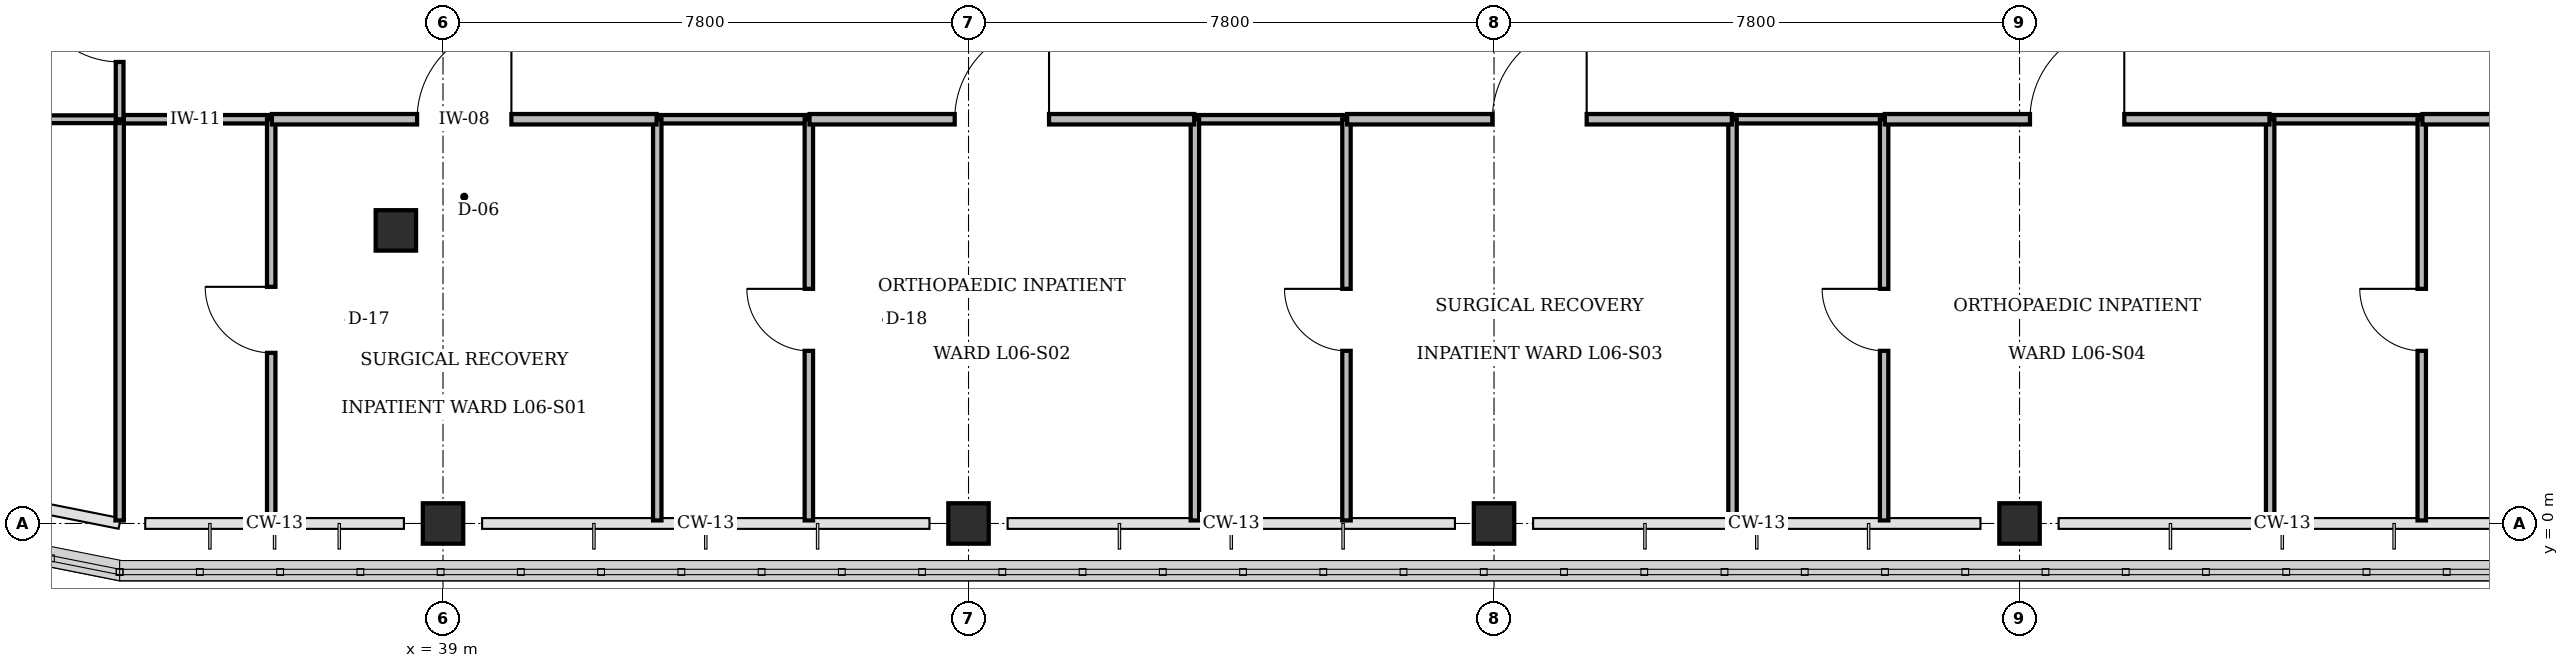
"""IFC4 building model, lengths in metres.
Left out: names, types, materials, properties, quantities, classifications, styles, units other than length and angle.
Written with IfcOpenShell. Run it as: python <this file> out.ifc"""

import sys

from ifc_helpers import new_model, si_unit, direction, frame, frame_2d, origin, origin_2d, place, context, subcontext, project, spatial, rectangle, circle, extrude, element, fill, save


model = new_model("IFC4")
c1 = context("Model", 3, precision=1e-05, world=origin(), true_north=direction((0.0, 1.0)))
c2 = subcontext(c1, "Body", "Model", "MODEL_VIEW")
j1 = project(units=[si_unit("LENGTHUNIT", "METRE"), si_unit("PLANEANGLEUNIT", "RADIAN")], contexts=[c1])
p1 = place(None, origin())
s1 = spatial("IfcSite", under=j1, at=p1, CompositionType="ELEMENT")
p2 = place(p1, origin())
s2 = spatial("IfcBuilding", under=s1, at=p2, CompositionType="ELEMENT")
p3 = place(p2, frame((0.0, 0.0, 26.4)))
s3 = spatial("IfcBuildingStorey", under=s2, at=p3, CompositionType="ELEMENT", Elevation=26.4)
for number, where, z_axis, x_axis in (
    (1, (39.0, 0.0, 0.0), (0.0, 0.0, 1.0), (1.0, 0.0, 0.0)),
    (2, (46.8, 0.0, 0.0), (0.0, 0.0, 1.0), (1.0, 0.0, 0.0)),
    (3, (54.6, 0.0, 0.0), (0.0, 0.0, 1.0), (1.0, 0.0, 0.0)),
    (4, (62.4, 0.0, 0.0), (0.0, 0.0, 1.0), (1.0, 0.0, 0.0)),
):
    element("IfcColumn", number, at=place(p3, frame(where, z_axis=z_axis, x_axis=x_axis)), inside=s3, PredefinedType="COLUMN", context=c2, shape_type="SweptSolid", body=[
        extrude(rectangle(XDim=0.6, YDim=0.6, at=origin_2d()), origin(), (0.0, 0.0, 1.0), 4.2),
    ])
p4 = place(p3, frame((38.3, 4.35, 0.0), z_axis=(0.0, 0.0, 1.0), x_axis=(1.0, 0.0, 0.0)))
e5 = element("IfcColumn", 5, at=p4, inside=s3, PredefinedType="PILASTER", context=c2, shape_type="SweptSolid", body=[
    extrude(circle(Radius=0.3, at=origin_2d()), origin(), (0.0, 0.0, 1.0), 4.2),
])
p5 = place(p3, frame((34.2, 6.0, 0.0), z_axis=(0.0, 0.0, 1.0), x_axis=(1.0, 0.0, 0.0)))
e6 = element("IfcWall", 6, at=p5, inside=s3, PredefinedType="PARTITIONING", context=c2, shape_type="SweptSolid", body=[
    extrude(rectangle(XDim=2.25, YDim=0.125, at=frame_2d((1.125, 0.0))), origin(), (0.0, 0.0, 1.0), 3.9),
])
p6 = place(p3, frame((34.2, 0.045, 0.0), z_axis=(0.0, 0.0, 1.0), x_axis=(0.0, 1.0, 0.0)))
e7 = element("IfcWall", 7, at=p6, inside=s3, PredefinedType="PARTITIONING", context=c2, shape_type="SweptSolid", body=[
    extrude(rectangle(XDim=5.955, YDim=0.125, at=frame_2d((2.978, 0.0))), origin(), (0.0, 0.0, 1.0), 3.9),
])
p7 = place(p3, frame((36.45, 0.045, 0.0), z_axis=(0.0, 0.0, 1.0), x_axis=(0.0, 1.0, 0.0)))
e8 = element("IfcWall", 8, at=p7, inside=s3, PredefinedType="PARTITIONING", context=c2, shape_type="SweptSolid", body=[
    extrude(rectangle(XDim=5.955, YDim=0.125, at=frame_2d((2.978, 0.0))), origin(), (0.0, 0.0, 1.0), 3.9),
])
p8 = place(p7, frame((2.488, 0.0, 0.0)))
e9 = element("IfcOpeningElement", 9, at=p8, cuts=e8, PredefinedType="OPENING", context=c2, shape_type="SweptSolid", body=[
    extrude(rectangle(XDim=0.98, YDim=2.1, at=frame_2d((0.49, 1.05))), frame((0.0, 0.073, 0.0), z_axis=(0.0, -1.0, 0.0), x_axis=(1.0, 0.0, 0.0)), (0.0, 0.0, 1.0), 0.145),
])
p9 = place(p3, frame((42.18, 6.0, 0.0), z_axis=(0.0, 0.0, 1.0), x_axis=(1.0, 0.0, 0.0)))
e10 = element("IfcWall", 10, at=p9, inside=s3, PredefinedType="PARTITIONING", context=c2, shape_type="SweptSolid", body=[
    extrude(rectangle(XDim=2.25, YDim=0.125, at=frame_2d((1.125, 0.0))), origin(), (0.0, 0.0, 1.0), 3.9),
])
p10 = place(p3, frame((42.18, 0.045, 0.0), z_axis=(0.0, 0.0, 1.0), x_axis=(0.0, 1.0, 0.0)))
e11 = element("IfcWall", 11, at=p10, inside=s3, PredefinedType="PARTITIONING", context=c2, shape_type="SweptSolid", body=[
    extrude(rectangle(XDim=5.955, YDim=0.125, at=frame_2d((2.978, 0.0))), origin(), (0.0, 0.0, 1.0), 3.9),
])
p11 = place(p3, frame((44.43, 0.045, 0.0), z_axis=(0.0, 0.0, 1.0), x_axis=(0.0, 1.0, 0.0)))
e12 = element("IfcWall", 12, at=p11, inside=s3, PredefinedType="PARTITIONING", context=c2, shape_type="SweptSolid", body=[
    extrude(rectangle(XDim=5.955, YDim=0.125, at=frame_2d((2.978, 0.0))), origin(), (0.0, 0.0, 1.0), 3.9),
])
p12 = place(p11, frame((2.518, 0.0, 0.0)))
e13 = element("IfcOpeningElement", 13, at=p12, cuts=e12, PredefinedType="OPENING", context=c2, shape_type="SweptSolid", body=[
    extrude(rectangle(XDim=0.92, YDim=2.1, at=frame_2d((0.46, 1.05))), frame((0.0, 0.073, 0.0), z_axis=(0.0, -1.0, 0.0), x_axis=(1.0, 0.0, 0.0)), (0.0, 0.0, 1.0), 0.145),
])
p13 = place(p3, frame((50.16, 6.0, 0.0), z_axis=(0.0, 0.0, 1.0), x_axis=(1.0, 0.0, 0.0)))
e14 = element("IfcWall", 14, at=p13, inside=s3, PredefinedType="PARTITIONING", context=c2, shape_type="SweptSolid", body=[
    extrude(rectangle(XDim=2.25, YDim=0.125, at=frame_2d((1.125, 0.0))), origin(), (0.0, 0.0, 1.0), 3.9),
])
p14 = place(p3, frame((50.16, 0.045, 0.0), z_axis=(0.0, 0.0, 1.0), x_axis=(0.0, 1.0, 0.0)))
e15 = element("IfcWall", 15, at=p14, inside=s3, PredefinedType="PARTITIONING", context=c2, shape_type="SweptSolid", body=[
    extrude(rectangle(XDim=5.955, YDim=0.125, at=frame_2d((2.978, 0.0))), origin(), (0.0, 0.0, 1.0), 3.9),
])
p15 = place(p3, frame((52.41, 0.045, 0.0), z_axis=(0.0, 0.0, 1.0), x_axis=(0.0, 1.0, 0.0)))
e16 = element("IfcWall", 16, at=p15, inside=s3, PredefinedType="PARTITIONING", context=c2, shape_type="SweptSolid", body=[
    extrude(rectangle(XDim=5.955, YDim=0.125, at=frame_2d((2.978, 0.0))), origin(), (0.0, 0.0, 1.0), 3.9),
])
p16 = place(p15, frame((2.518, 0.0, 0.0)))
e17 = element("IfcOpeningElement", 17, at=p16, cuts=e16, PredefinedType="OPENING", context=c2, shape_type="SweptSolid", body=[
    extrude(rectangle(XDim=0.92, YDim=2.1, at=frame_2d((0.46, 1.05))), frame((0.0, 0.073, 0.0), z_axis=(0.0, -1.0, 0.0), x_axis=(1.0, 0.0, 0.0)), (0.0, 0.0, 1.0), 0.145),
])
p17 = place(p3, frame((58.14, 6.0, 0.0), z_axis=(0.0, 0.0, 1.0), x_axis=(1.0, 0.0, 0.0)))
e18 = element("IfcWall", 18, at=p17, inside=s3, PredefinedType="PARTITIONING", context=c2, shape_type="SweptSolid", body=[
    extrude(rectangle(XDim=2.25, YDim=0.125, at=frame_2d((1.125, 0.0))), origin(), (0.0, 0.0, 1.0), 3.9),
])
p18 = place(p3, frame((58.14, 0.045, 0.0), z_axis=(0.0, 0.0, 1.0), x_axis=(0.0, 1.0, 0.0)))
e19 = element("IfcWall", 19, at=p18, inside=s3, PredefinedType="PARTITIONING", context=c2, shape_type="SweptSolid", body=[
    extrude(rectangle(XDim=5.955, YDim=0.125, at=frame_2d((2.978, 0.0))), origin(), (0.0, 0.0, 1.0), 3.9),
])
p19 = place(p3, frame((60.39, 0.045, 0.0), z_axis=(0.0, 0.0, 1.0), x_axis=(0.0, 1.0, 0.0)))
e20 = element("IfcWall", 20, at=p19, inside=s3, PredefinedType="PARTITIONING", context=c2, shape_type="SweptSolid", body=[
    extrude(rectangle(XDim=5.955, YDim=0.125, at=frame_2d((2.978, 0.0))), origin(), (0.0, 0.0, 1.0), 3.9),
])
p20 = place(p19, frame((2.518, 0.0, 0.0)))
e21 = element("IfcOpeningElement", 21, at=p20, cuts=e20, PredefinedType="OPENING", context=c2, shape_type="SweptSolid", body=[
    extrude(rectangle(XDim=0.92, YDim=2.1, at=frame_2d((0.46, 1.05))), frame((0.0, 0.073, 0.0), z_axis=(0.0, -1.0, 0.0), x_axis=(1.0, 0.0, 0.0)), (0.0, 0.0, 1.0), 0.145),
])
p21 = place(p3, frame((66.12, 6.0, 0.0), z_axis=(0.0, 0.0, 1.0), x_axis=(1.0, 0.0, 0.0)))
e22 = element("IfcWall", 22, at=p21, inside=s3, PredefinedType="PARTITIONING", context=c2, shape_type="SweptSolid", body=[
    extrude(rectangle(XDim=2.25, YDim=0.125, at=frame_2d((1.125, 0.0))), origin(), (0.0, 0.0, 1.0), 3.9),
])
p22 = place(p3, frame((66.12, 0.045, 0.0), z_axis=(0.0, 0.0, 1.0), x_axis=(0.0, 1.0, 0.0)))
e23 = element("IfcWall", 23, at=p22, inside=s3, PredefinedType="PARTITIONING", context=c2, shape_type="SweptSolid", body=[
    extrude(rectangle(XDim=5.955, YDim=0.125, at=frame_2d((2.978, 0.0))), origin(), (0.0, 0.0, 1.0), 3.9),
])
p23 = place(p3, frame((68.37, 0.045, 0.0), z_axis=(0.0, 0.0, 1.0), x_axis=(0.0, 1.0, 0.0)))
e24 = element("IfcWall", 24, at=p23, inside=s3, PredefinedType="PARTITIONING", context=c2, shape_type="SweptSolid", body=[
    extrude(rectangle(XDim=5.955, YDim=0.125, at=frame_2d((2.978, 0.0))), origin(), (0.0, 0.0, 1.0), 3.9),
])
p24 = place(p23, frame((2.518, 0.0, 0.0)))
e25 = element("IfcOpeningElement", 25, at=p24, cuts=e24, PredefinedType="OPENING", context=c2, shape_type="SweptSolid", body=[
    extrude(rectangle(XDim=0.92, YDim=2.1, at=frame_2d((0.46, 1.05))), frame((0.0, 0.073, 0.0), z_axis=(0.0, -1.0, 0.0), x_axis=(1.0, 0.0, 0.0)), (0.0, 0.0, 1.0), 0.145),
])
p25 = place(p3, frame((22.1, 6.0, 0.0), z_axis=(0.0, 0.0, 1.0), x_axis=(1.0, 0.0, 0.0)))
e26 = element("IfcWall", 26, at=p25, inside=s3, PredefinedType="PARTITIONING", context=c2, shape_type="SweptSolid", body=[
    extrude(rectangle(XDim=12.1, YDim=0.115, at=frame_2d((6.05, 0.0))), origin(), (0.0, 0.0, 1.0), 3.9),
])
p26 = place(p3, frame((34.2, 6.0, 0.0), z_axis=(0.0, 0.0, 1.0), x_axis=(0.0, 1.0, 0.0)))
e27 = element("IfcWall", 27, at=p26, inside=s3, PredefinedType="PARTITIONING", context=c2, shape_type="SweptSolid", body=[
    extrude(rectangle(XDim=13.2, YDim=0.115, at=frame_2d((6.6, 0.0))), origin(), (0.0, 0.0, 1.0), 3.9),
])
p27 = place(p26, frame((0.85, 0.0, 0.0)))
e28 = element("IfcOpeningElement", 28, at=p27, cuts=e27, PredefinedType="OPENING", context=c2, shape_type="SweptSolid", body=[
    extrude(rectangle(XDim=1.32, YDim=2.15, at=frame_2d((0.66, 1.075))), frame((0.0, 0.067, 0.0), z_axis=(0.0, -1.0, 0.0), x_axis=(1.0, 0.0, 0.0)), (0.0, 0.0, 1.0), 0.135),
])
p28 = place(p3, frame((36.46, 6.0, 0.0), z_axis=(0.0, 0.0, 1.0), x_axis=(1.0, 0.0, 0.0)))
e29 = element("IfcWall", 29, at=p28, inside=s3, PredefinedType="PARTITIONING", context=c2, shape_type="SweptSolid", body=[
    extrude(rectangle(XDim=5.71, YDim=0.155, at=frame_2d((2.855, 0.0))), origin(), (0.0, 0.0, 1.0), 3.9),
])
p29 = place(p28, frame((2.155, 0.0, 0.0)))
e30 = element("IfcOpeningElement", 30, at=p29, cuts=e29, PredefinedType="OPENING", context=c2, shape_type="SweptSolid", body=[
    extrude(rectangle(XDim=1.4, YDim=2.2, at=frame_2d((0.7, 1.1))), frame((0.0, 0.087, 0.0), z_axis=(0.0, -1.0, 0.0), x_axis=(1.0, 0.0, 0.0)), (0.0, 0.0, 1.0), 0.175),
])
p30 = place(p3, frame((44.44, 6.0, 0.0), z_axis=(0.0, 0.0, 1.0), x_axis=(1.0, 0.0, 0.0)))
e31 = element("IfcWall", 31, at=p30, inside=s3, PredefinedType="PARTITIONING", context=c2, shape_type="SweptSolid", body=[
    extrude(rectangle(XDim=5.71, YDim=0.155, at=frame_2d((2.855, 0.0))), origin(), (0.0, 0.0, 1.0), 3.9),
])
p31 = place(p30, frame((2.155, 0.0, 0.0)))
e32 = element("IfcOpeningElement", 32, at=p31, cuts=e31, PredefinedType="OPENING", context=c2, shape_type="SweptSolid", body=[
    extrude(rectangle(XDim=1.4, YDim=2.2, at=frame_2d((0.7, 1.1))), frame((0.0, 0.087, 0.0), z_axis=(0.0, -1.0, 0.0), x_axis=(1.0, 0.0, 0.0)), (0.0, 0.0, 1.0), 0.175),
])
p32 = place(p3, frame((52.42, 6.0, 0.0), z_axis=(0.0, 0.0, 1.0), x_axis=(1.0, 0.0, 0.0)))
e33 = element("IfcWall", 33, at=p32, inside=s3, PredefinedType="PARTITIONING", context=c2, shape_type="SweptSolid", body=[
    extrude(rectangle(XDim=5.71, YDim=0.155, at=frame_2d((2.855, 0.0))), origin(), (0.0, 0.0, 1.0), 3.9),
])
p33 = place(p32, frame((2.155, 0.0, 0.0)))
e34 = element("IfcOpeningElement", 34, at=p33, cuts=e33, PredefinedType="OPENING", context=c2, shape_type="SweptSolid", body=[
    extrude(rectangle(XDim=1.4, YDim=2.2, at=frame_2d((0.7, 1.1))), frame((0.0, 0.087, 0.0), z_axis=(0.0, -1.0, 0.0), x_axis=(1.0, 0.0, 0.0)), (0.0, 0.0, 1.0), 0.175),
])
p34 = place(p3, frame((60.4, 6.0, 0.0), z_axis=(0.0, 0.0, 1.0), x_axis=(1.0, 0.0, 0.0)))
e35 = element("IfcWall", 35, at=p34, inside=s3, PredefinedType="PARTITIONING", context=c2, shape_type="SweptSolid", body=[
    extrude(rectangle(XDim=5.71, YDim=0.155, at=frame_2d((2.855, 0.0))), origin(), (0.0, 0.0, 1.0), 3.9),
])
p35 = place(p34, frame((2.155, 0.0, 0.0)))
e36 = element("IfcOpeningElement", 36, at=p35, cuts=e35, PredefinedType="OPENING", context=c2, shape_type="SweptSolid", body=[
    extrude(rectangle(XDim=1.4, YDim=2.2, at=frame_2d((0.7, 1.1))), frame((0.0, 0.087, 0.0), z_axis=(0.0, -1.0, 0.0), x_axis=(1.0, 0.0, 0.0)), (0.0, 0.0, 1.0), 0.175),
])
p36 = place(p3, frame((68.38, 6.0, 0.0), z_axis=(0.0, 0.0, 1.0), x_axis=(1.0, 0.0, 0.0)))
e37 = element("IfcWall", 37, at=p36, inside=s3, PredefinedType="PARTITIONING", context=c2, shape_type="SweptSolid", body=[
    extrude(rectangle(XDim=5.71, YDim=0.155, at=frame_2d((2.855, 0.0))), origin(), (0.0, 0.0, 1.0), 3.9),
])
p37 = place(p36, frame((2.155, 0.0, 0.0)))
e38 = element("IfcOpeningElement", 38, at=p37, cuts=e37, PredefinedType="OPENING", context=c2, shape_type="SweptSolid", body=[
    extrude(rectangle(XDim=1.4, YDim=2.2, at=frame_2d((0.7, 1.1))), frame((0.0, 0.087, 0.0), z_axis=(0.0, -1.0, 0.0), x_axis=(1.0, 0.0, 0.0)), (0.0, 0.0, 1.0), 0.175),
])
p38 = place(p8, origin())
e39 = element("IfcDoor", 39, at=p38, inside=s3, OperationType="SINGLE_SWING_RIGHT", PredefinedType="DOOR", context=c2, shape_type="SweptSolid", body=[
    extrude(rectangle(XDim=0.98, YDim=2.1, at=frame_2d((0.49, 1.05))), frame((0.0, 0.025, 0.0), z_axis=(0.0, -1.0, 0.0), x_axis=(1.0, 0.0, 0.0)), (0.0, 0.0, 1.0), 0.05),
])
fill(e9, e39)
p39 = place(p12, origin())
e40 = element("IfcDoor", 40, at=p39, inside=s3, OperationType="SINGLE_SWING_RIGHT", PredefinedType="DOOR", context=c2, shape_type="SweptSolid", body=[
    extrude(rectangle(XDim=0.92, YDim=2.1, at=frame_2d((0.46, 1.05))), frame((0.0, 0.025, 0.0), z_axis=(0.0, -1.0, 0.0), x_axis=(1.0, 0.0, 0.0)), (0.0, 0.0, 1.0), 0.05),
])
fill(e13, e40)
p40 = place(p16, origin())
e41 = element("IfcDoor", 41, at=p40, inside=s3, OperationType="SINGLE_SWING_RIGHT", PredefinedType="DOOR", context=c2, shape_type="SweptSolid", body=[
    extrude(rectangle(XDim=0.92, YDim=2.1, at=frame_2d((0.46, 1.05))), frame((0.0, 0.025, 0.0), z_axis=(0.0, -1.0, 0.0), x_axis=(1.0, 0.0, 0.0)), (0.0, 0.0, 1.0), 0.05),
])
fill(e17, e41)
p41 = place(p20, origin())
e42 = element("IfcDoor", 42, at=p41, inside=s3, OperationType="SINGLE_SWING_RIGHT", PredefinedType="DOOR", context=c2, shape_type="SweptSolid", body=[
    extrude(rectangle(XDim=0.92, YDim=2.1, at=frame_2d((0.46, 1.05))), frame((0.0, 0.025, 0.0), z_axis=(0.0, -1.0, 0.0), x_axis=(1.0, 0.0, 0.0)), (0.0, 0.0, 1.0), 0.05),
])
fill(e21, e42)
p42 = place(p24, origin())
e43 = element("IfcDoor", 43, at=p42, inside=s3, OperationType="SINGLE_SWING_RIGHT", PredefinedType="DOOR", context=c2, shape_type="SweptSolid", body=[
    extrude(rectangle(XDim=0.92, YDim=2.1, at=frame_2d((0.46, 1.05))), frame((0.0, 0.025, 0.0), z_axis=(0.0, -1.0, 0.0), x_axis=(1.0, 0.0, 0.0)), (0.0, 0.0, 1.0), 0.05),
])
fill(e25, e43)
p43 = place(p27, origin())
e44 = element("IfcDoor", 44, at=p43, inside=s3, OperationType="SINGLE_SWING_RIGHT", PredefinedType="DOOR", context=c2, shape_type="SweptSolid", body=[
    extrude(rectangle(XDim=1.32, YDim=2.15, at=frame_2d((0.66, 1.075))), frame((0.0, 0.025, 0.0), z_axis=(0.0, -1.0, 0.0), x_axis=(1.0, 0.0, 0.0)), (0.0, 0.0, 1.0), 0.05),
])
fill(e28, e44)
p44 = place(p29, origin())
e45 = element("IfcDoor", 45, at=p44, inside=s3, OperationType="SINGLE_SWING_RIGHT", PredefinedType="DOOR", context=c2, shape_type="SweptSolid", body=[
    extrude(rectangle(XDim=1.4, YDim=2.2, at=frame_2d((0.7, 1.1))), frame((0.0, 0.025, 0.0), z_axis=(0.0, -1.0, 0.0), x_axis=(1.0, 0.0, 0.0)), (0.0, 0.0, 1.0), 0.05),
])
fill(e30, e45)
p45 = place(p31, origin())
e46 = element("IfcDoor", 46, at=p45, inside=s3, OperationType="SINGLE_SWING_RIGHT", PredefinedType="DOOR", context=c2, shape_type="SweptSolid", body=[
    extrude(rectangle(XDim=1.4, YDim=2.2, at=frame_2d((0.7, 1.1))), frame((0.0, 0.025, 0.0), z_axis=(0.0, -1.0, 0.0), x_axis=(1.0, 0.0, 0.0)), (0.0, 0.0, 1.0), 0.05),
])
fill(e32, e46)
p46 = place(p33, origin())
e47 = element("IfcDoor", 47, at=p46, inside=s3, OperationType="SINGLE_SWING_RIGHT", PredefinedType="DOOR", context=c2, shape_type="SweptSolid", body=[
    extrude(rectangle(XDim=1.4, YDim=2.2, at=frame_2d((0.7, 1.1))), frame((0.0, 0.025, 0.0), z_axis=(0.0, -1.0, 0.0), x_axis=(1.0, 0.0, 0.0)), (0.0, 0.0, 1.0), 0.05),
])
fill(e34, e47)
p47 = place(p35, origin())
e48 = element("IfcDoor", 48, at=p47, inside=s3, OperationType="SINGLE_SWING_RIGHT", PredefinedType="DOOR", context=c2, shape_type="SweptSolid", body=[
    extrude(rectangle(XDim=1.4, YDim=2.2, at=frame_2d((0.7, 1.1))), frame((0.0, 0.025, 0.0), z_axis=(0.0, -1.0, 0.0), x_axis=(1.0, 0.0, 0.0)), (0.0, 0.0, 1.0), 0.05),
])
fill(e36, e48)
save(model, sys.argv[1])
